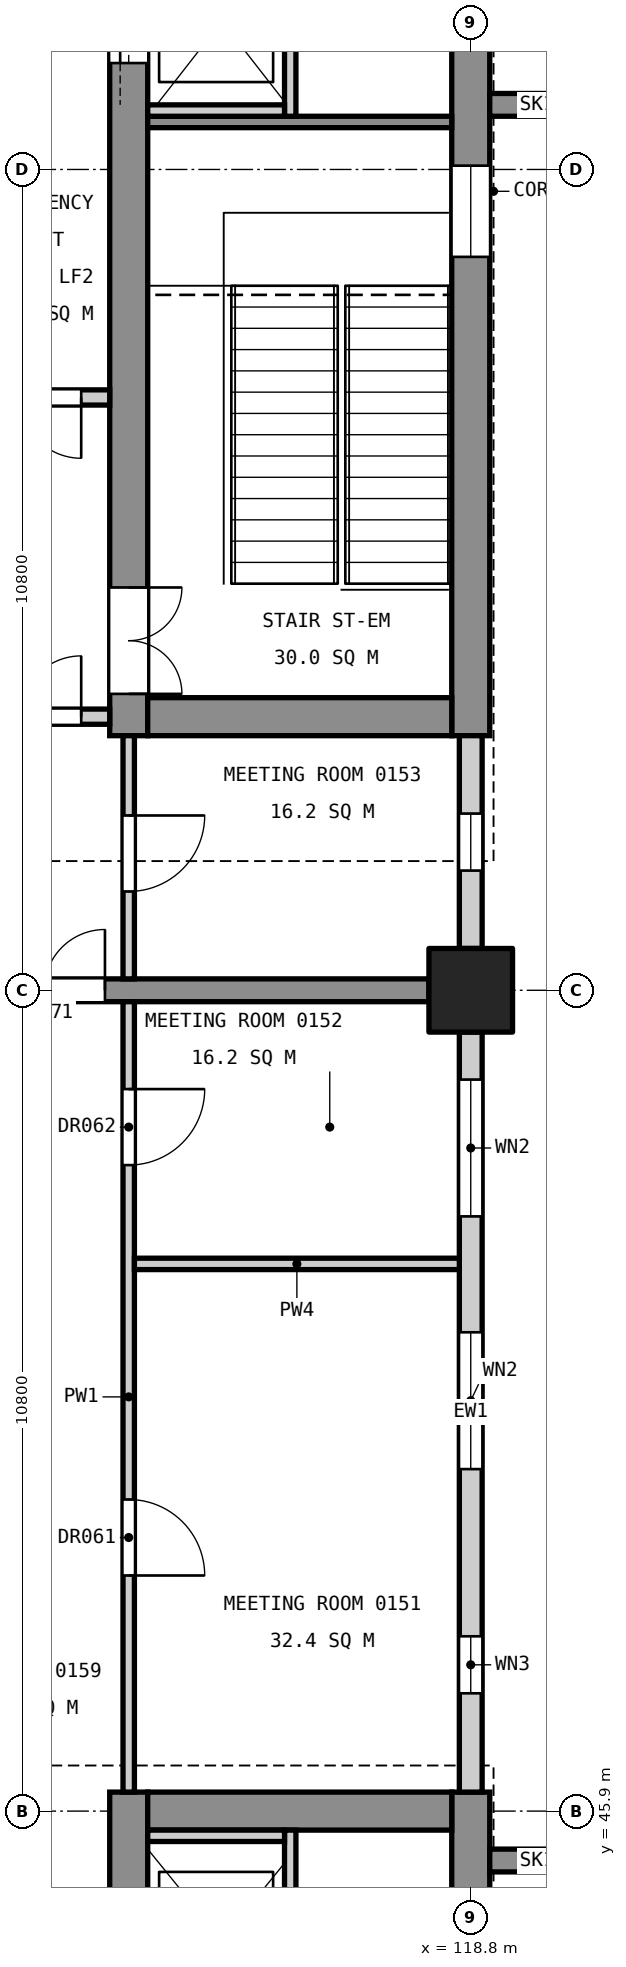
"""IFC4 building model, lengths in metres.
Left out: names, types, materials, properties, quantities, classifications, styles, units other than length and angle.
Written with IfcOpenShell. Run it as: python <this file> out.ifc"""

import sys

from ifc_helpers import new_model, si_unit, direction, frame, frame_2d, origin, origin_2d, place, context, subcontext, project, spatial, rectangle, extrude, element, fill, save


model = new_model("IFC4")
c1 = context("Model", 3, precision=1e-05, world=origin(), true_north=direction((0.0, 1.0)))
c2 = subcontext(c1, "Body", "Model", "MODEL_VIEW")
j1 = project(units=[si_unit("LENGTHUNIT", "METRE"), si_unit("PLANEANGLEUNIT", "RADIAN")], contexts=[c1])
p1 = place(None, origin())
s1 = spatial("IfcSite", under=j1, at=p1, CompositionType="ELEMENT")
p2 = place(p1, origin())
s2 = spatial("IfcBuilding", under=s1, at=p2, CompositionType="ELEMENT")
p3 = place(p2, frame((0.0, 0.0, 6.0)))
s3 = spatial("IfcBuildingStorey", under=s2, at=p3, CompositionType="ELEMENT", Elevation=6.0)
p4 = place(p3, frame((118.8, 56.7, 0.0), z_axis=(0.0, 0.0, 1.0), x_axis=(1.0, 0.0, 0.0)))
e1 = element("IfcColumn", 1, at=p4, inside=s3, PredefinedType="COLUMN", context=c2, shape_type="SweptSolid", body=[
    extrude(rectangle(XDim=1.1, YDim=1.1, at=origin_2d()), origin(), (0.0, 0.0, 1.0), 5.4),
])
p5 = place(p3, frame((118.8, 34.85, 0.0), z_axis=(0.0, 0.0, 1.0), x_axis=(0.0, 1.0, 0.0)))
e2 = element("IfcWall", 2, at=p5, inside=s3, PredefinedType="SHEAR", context=c2, shape_type="SweptSolid", body=[
    extrude(rectangle(XDim=11.3, YDim=0.5, at=frame_2d((5.65, 0.0))), origin(), (0.0, 0.0, 1.0), 5.1),
])
p6 = place(p5, frame((6.3, 0.0, 3.4)))
e3 = element("IfcOpeningElement", 3, at=p6, cuts=e2, PredefinedType="OPENING", context=c2, shape_type="SweptSolid", body=[
    extrude(rectangle(XDim=1.2, YDim=0.9, at=frame_2d((0.6, 0.45))), frame((0.0, 0.26, 0.0), z_axis=(0.0, -1.0, 0.0), x_axis=(1.0, 0.0, 0.0)), (0.0, 0.0, 1.0), 0.52),
])
p7 = place(p3, frame((114.3, 34.85, 0.0), z_axis=(0.0, 0.0, 1.0), x_axis=(0.0, 1.0, 0.0)))
e4 = element("IfcWall", 4, at=p7, inside=s3, PredefinedType="SHEAR", context=c2, shape_type="SweptSolid", body=[
    extrude(rectangle(XDim=11.3, YDim=0.5, at=frame_2d((5.65, 0.0))), origin(), (0.0, 0.0, 1.0), 5.1),
])
p8 = place(p7, frame((0.55, 0.0, 0.0)))
e5 = element("IfcOpeningElement", 5, at=p8, cuts=e4, PredefinedType="OPENING", context=c2, shape_type="SweptSolid", body=[
    extrude(rectangle(XDim=1.4, YDim=2.1, at=frame_2d((0.7, 1.05))), frame((0.0, 0.26, 0.0), z_axis=(0.0, -1.0, 0.0), x_axis=(1.0, 0.0, 0.0)), (0.0, 0.0, 1.0), 0.52),
])
p9 = place(p7, frame((8.8, 0.0, 0.0)))
e6 = element("IfcOpeningElement", 6, at=p9, cuts=e4, PredefinedType="OPENING", context=c2, shape_type="SweptSolid", body=[
    extrude(rectangle(XDim=1.1, YDim=2.1, at=frame_2d((0.55, 1.05))), frame((0.0, 0.26, 0.0), z_axis=(0.0, -1.0, 0.0), x_axis=(1.0, 0.0, 0.0)), (0.0, 0.0, 1.0), 0.52),
])
p10 = place(p3, frame((118.55, 45.9, 0.0), z_axis=(0.0, 0.0, 1.0), x_axis=(-1.0, 0.0, 0.0)))
e7 = element("IfcWall", 7, at=p10, inside=s3, PredefinedType="SHEAR", context=c2, shape_type="SweptSolid", body=[
    extrude(rectangle(XDim=4.0, YDim=0.5, at=frame_2d((2.0, 0.0))), origin(), (0.0, 0.0, 1.0), 5.1),
])
p11 = place(p3, frame((118.8, 60.05, 0.0), z_axis=(0.0, 0.0, 1.0), x_axis=(0.0, 1.0, 0.0)))
e8 = element("IfcWall", 8, at=p11, inside=s3, PredefinedType="SHEAR", context=c2, shape_type="SweptSolid", body=[
    extrude(rectangle(XDim=14.9, YDim=0.5, at=frame_2d((7.45, 0.0))), origin(), (0.0, 0.0, 1.0), 5.1),
])
p12 = place(p11, frame((6.3, 0.0, 3.4)))
e9 = element("IfcOpeningElement", 9, at=p12, cuts=e8, PredefinedType="OPENING", context=c2, shape_type="SweptSolid", body=[
    extrude(rectangle(XDim=1.2, YDim=0.9, at=frame_2d((0.6, 0.45))), frame((0.0, 0.26, 0.0), z_axis=(0.0, -1.0, 0.0), x_axis=(1.0, 0.0, 0.0)), (0.0, 0.0, 1.0), 0.52),
])
p13 = place(p3, frame((114.3, 60.05, 0.0), z_axis=(0.0, 0.0, 1.0), x_axis=(0.0, 1.0, 0.0)))
e10 = element("IfcWall", 10, at=p13, inside=s3, PredefinedType="SHEAR", context=c2, shape_type="SweptSolid", body=[
    extrude(rectangle(XDim=14.9, YDim=0.5, at=frame_2d((7.45, 0.0))), origin(), (0.0, 0.0, 1.0), 5.1),
])
p14 = place(p13, frame((0.55, 0.0, 0.0)))
e11 = element("IfcOpeningElement", 11, at=p14, cuts=e10, PredefinedType="OPENING", context=c2, shape_type="SweptSolid", body=[
    extrude(rectangle(XDim=1.4, YDim=2.1, at=frame_2d((0.7, 1.05))), frame((0.0, 0.26, 0.0), z_axis=(0.0, -1.0, 0.0), x_axis=(1.0, 0.0, 0.0)), (0.0, 0.0, 1.0), 0.52),
])
p15 = place(p13, frame((8.85, 0.0, 0.0)))
e12 = element("IfcOpeningElement", 12, at=p15, cuts=e10, PredefinedType="OPENING", context=c2, shape_type="SweptSolid", body=[
    extrude(rectangle(XDim=1.1, YDim=2.1, at=frame_2d((0.55, 1.05))), frame((0.0, 0.26, 0.0), z_axis=(0.0, -1.0, 0.0), x_axis=(1.0, 0.0, 0.0)), (0.0, 0.0, 1.0), 0.52),
])
p16 = place(p13, frame((11.4, 0.0, 0.0)))
e13 = element("IfcOpeningElement", 13, at=p16, cuts=e10, PredefinedType="OPENING", context=c2, shape_type="SweptSolid", body=[
    extrude(rectangle(XDim=1.1, YDim=2.1, at=frame_2d((0.55, 1.05))), frame((0.0, 0.26, 0.0), z_axis=(0.0, -1.0, 0.0), x_axis=(1.0, 0.0, 0.0)), (0.0, 0.0, 1.0), 0.52),
])
p17 = place(p3, frame((118.55, 60.3, 0.0), z_axis=(0.0, 0.0, 1.0), x_axis=(-1.0, 0.0, 0.0)))
e14 = element("IfcWall", 14, at=p17, inside=s3, PredefinedType="SHEAR", context=c2, shape_type="SweptSolid", body=[
    extrude(rectangle(XDim=4.0, YDim=0.5, at=frame_2d((2.0, 0.0))), origin(), (0.0, 0.0, 1.0), 5.1),
])
for number, where, z_axis, x_axis in (
    (15, (119.05, 45.25, 0.0), (0.0, 0.0, 1.0), (1.0, 0.0, 0.0)),
    (16, (119.05, 68.35, 0.0), (0.0, 0.0, 1.0), (1.0, 0.0, 0.0)),
):
    element("IfcWall", number, at=place(p3, frame(where, z_axis=z_axis, x_axis=x_axis)), inside=s3, PredefinedType="SHEAR", context=c2, shape_type="SweptSolid", body=[
        extrude(rectangle(XDim=1.25, YDim=0.3, at=frame_2d((0.625, 0.0))), origin(), (0.0, 0.0, 1.0), 5.4),
    ])
p18 = place(p3, frame((118.25, 56.7, 0.0), z_axis=(0.0, 0.0, 1.0), x_axis=(-1.0, 0.0, 0.0)))
e17 = element("IfcWall", 17, at=p18, inside=s3, PredefinedType="SHEAR", context=c2, shape_type="SweptSolid", body=[
    extrude(rectangle(XDim=6.1, YDim=0.3, at=frame_2d((3.05, 0.0))), origin(), (0.0, 0.0, 1.0), 5.1),
])
p19 = place(p18, frame((4.262, 0.0, 0.0)))
e18 = element("IfcOpeningElement", 18, at=p19, cuts=e17, PredefinedType="OPENING", context=c2, shape_type="SweptSolid", body=[
    extrude(rectangle(XDim=1.6, YDim=2.1, at=frame_2d((0.8, 1.05))), frame((0.0, 0.16, 0.0), z_axis=(0.0, -1.0, 0.0), x_axis=(1.0, 0.0, 0.0)), (0.0, 0.0, 1.0), 0.32),
])
p20 = place(p3, frame((118.55, 68.125, 0.0), z_axis=(0.0, 0.0, 1.0), x_axis=(-1.0, 0.0, 0.0)))
e19 = element("IfcWall", 19, at=p20, inside=s3, PredefinedType="SOLIDWALL", context=c2, shape_type="SweptSolid", body=[
    extrude(rectangle(XDim=4.0, YDim=0.15, at=frame_2d((2.0, 0.0))), origin(), (0.0, 0.0, 1.0), 5.1),
])
p21 = place(p3, frame((116.425, 43.0, 0.0), z_axis=(0.0, 0.0, 1.0), x_axis=(0.0, 1.0, 0.0)))
e20 = element("IfcWall", 20, at=p21, inside=s3, PredefinedType="SOLIDWALL", context=c2, shape_type="SweptSolid", body=[
    extrude(rectangle(XDim=2.65, YDim=0.15, at=frame_2d((1.325, 0.0))), origin(), (0.0, 0.0, 1.0), 5.4),
])
p22 = place(p3, frame((116.35, 45.575, 0.0), z_axis=(0.0, 0.0, 1.0), x_axis=(-1.0, 0.0, 0.0)))
e21 = element("IfcWall", 21, at=p22, inside=s3, PredefinedType="SOLIDWALL", context=c2, shape_type="SweptSolid", body=[
    extrude(rectangle(XDim=1.8, YDim=0.15, at=frame_2d((0.9, 0.0))), origin(), (0.0, 0.0, 1.0), 5.4),
])
p23 = place(p3, frame((116.425, 68.2, 0.0), z_axis=(0.0, 0.0, 1.0), x_axis=(0.0, 1.0, 0.0)))
e22 = element("IfcWall", 22, at=p23, inside=s3, PredefinedType="SOLIDWALL", context=c2, shape_type="SweptSolid", body=[
    extrude(rectangle(XDim=2.5, YDim=0.15, at=frame_2d((1.25, 0.0))), origin(), (0.0, 0.0, 1.0), 5.4),
])
p24 = place(p3, frame((116.35, 68.275, 0.0), z_axis=(0.0, 0.0, 1.0), x_axis=(-1.0, 0.0, 0.0)))
e23 = element("IfcWall", 23, at=p24, inside=s3, PredefinedType="SOLIDWALL", context=c2, shape_type="SweptSolid", body=[
    extrude(rectangle(XDim=1.8, YDim=0.15, at=frame_2d((0.9, 0.0))), origin(), (0.0, 0.0, 1.0), 5.4),
])
p25 = place(p3, frame((118.8, 46.15, 0.0), z_axis=(0.0, 0.0, 1.0), x_axis=(0.0, 1.0, 0.0)))
e24 = element("IfcWall", 24, at=p25, inside=s3, PredefinedType="STANDARD", context=c2, shape_type="SweptSolid", body=[
    extrude(rectangle(XDim=10.0, YDim=0.3, at=frame_2d((5.0, 0.0))), origin(), (0.0, 0.0, 1.0), 4.1),
])
p26 = place(p25, frame((1.3, 0.0, 0.8)))
e25 = element("IfcOpeningElement", 25, at=p26, cuts=e24, PredefinedType="OPENING", context=c2, shape_type="SweptSolid", body=[
    extrude(rectangle(XDim=0.75, YDim=1.2, at=frame_2d((0.375, 0.6))), frame((0.0, 0.16, 0.0), z_axis=(0.0, -1.0, 0.0), x_axis=(1.0, 0.0, 0.0)), (0.0, 0.0, 1.0), 0.32),
])
p27 = place(p25, frame((4.25, 0.0, 0.9)))
e26 = element("IfcOpeningElement", 26, at=p27, cuts=e24, PredefinedType="OPENING", context=c2, shape_type="SweptSolid", body=[
    extrude(rectangle(XDim=1.8, YDim=3.0, at=frame_2d((0.9, 1.5))), frame((0.0, 0.16, 0.0), z_axis=(0.0, -1.0, 0.0), x_axis=(1.0, 0.0, 0.0)), (0.0, 0.0, 1.0), 0.32),
])
p28 = place(p25, frame((7.575, 0.0, 0.9)))
e27 = element("IfcOpeningElement", 27, at=p28, cuts=e24, PredefinedType="OPENING", context=c2, shape_type="SweptSolid", body=[
    extrude(rectangle(XDim=1.8, YDim=3.0, at=frame_2d((0.9, 1.5))), frame((0.0, 0.16, 0.0), z_axis=(0.0, -1.0, 0.0), x_axis=(1.0, 0.0, 0.0)), (0.0, 0.0, 1.0), 0.32),
])
p29 = place(p3, frame((118.8, 57.25, 0.0), z_axis=(0.0, 0.0, 1.0), x_axis=(0.0, 1.0, 0.0)))
e28 = element("IfcWall", 28, at=p29, inside=s3, PredefinedType="STANDARD", context=c2, shape_type="SweptSolid", body=[
    extrude(rectangle(XDim=2.8, YDim=0.3, at=frame_2d((1.4, 0.0))), origin(), (0.0, 0.0, 1.0), 4.1),
])
p30 = place(p29, frame((1.025, 0.0, 0.8)))
e29 = element("IfcOpeningElement", 29, at=p30, cuts=e28, PredefinedType="OPENING", context=c2, shape_type="SweptSolid", body=[
    extrude(rectangle(XDim=0.75, YDim=1.2, at=frame_2d((0.375, 0.6))), frame((0.0, 0.16, 0.0), z_axis=(0.0, -1.0, 0.0), x_axis=(1.0, 0.0, 0.0)), (0.0, 0.0, 1.0), 0.32),
])
p31 = place(p3, frame((114.3, 46.15, 0.0), z_axis=(0.0, 0.0, 1.0), x_axis=(0.0, 1.0, 0.0)))
e30 = element("IfcWall", 30, at=p31, inside=s3, PredefinedType="PARTITIONING", context=c2, shape_type="SweptSolid", body=[
    extrude(rectangle(XDim=10.4, YDim=0.15, at=frame_2d((5.2, 0.0))), origin(), (0.0, 0.0, 1.0), 4.0),
])
p32 = place(p31, frame((2.85, 0.0, 0.0)))
e31 = element("IfcOpeningElement", 31, at=p32, cuts=e30, PredefinedType="OPENING", context=c2, shape_type="SweptSolid", body=[
    extrude(rectangle(XDim=1.0, YDim=2.1, at=frame_2d((0.5, 1.05))), frame((0.0, 0.085, 0.0), z_axis=(0.0, -1.0, 0.0), x_axis=(1.0, 0.0, 0.0)), (0.0, 0.0, 1.0), 0.17),
])
p33 = place(p31, frame((8.25, 0.0, 0.0)))
e32 = element("IfcOpeningElement", 32, at=p33, cuts=e30, PredefinedType="OPENING", context=c2, shape_type="SweptSolid", body=[
    extrude(rectangle(XDim=1.0, YDim=2.1, at=frame_2d((0.5, 1.05))), frame((0.0, 0.085, 0.0), z_axis=(0.0, -1.0, 0.0), x_axis=(1.0, 0.0, 0.0)), (0.0, 0.0, 1.0), 0.17),
])
p34 = place(p3, frame((114.3, 56.85, 0.0), z_axis=(0.0, 0.0, 1.0), x_axis=(0.0, 1.0, 0.0)))
e33 = element("IfcWall", 33, at=p34, inside=s3, PredefinedType="PARTITIONING", context=c2, shape_type="SweptSolid", body=[
    extrude(rectangle(XDim=3.2, YDim=0.15, at=frame_2d((1.6, 0.0))), origin(), (0.0, 0.0, 1.0), 4.0),
])
p35 = place(p34, frame((1.15, 0.0, 0.0)))
e34 = element("IfcOpeningElement", 34, at=p35, cuts=e33, PredefinedType="OPENING", context=c2, shape_type="SweptSolid", body=[
    extrude(rectangle(XDim=1.0, YDim=2.1, at=frame_2d((0.5, 1.05))), frame((0.0, 0.085, 0.0), z_axis=(0.0, -1.0, 0.0), x_axis=(1.0, 0.0, 0.0)), (0.0, 0.0, 1.0), 0.17),
])
p36 = place(p3, frame((118.65, 53.1, 0.0), z_axis=(0.0, 0.0, 1.0), x_axis=(-1.0, 0.0, 0.0)))
e35 = element("IfcWall", 35, at=p36, inside=s3, PredefinedType="PARTITIONING", context=c2, shape_type="SweptSolid", body=[
    extrude(rectangle(XDim=4.275, YDim=0.15, at=frame_2d((2.137, 0.0))), origin(), (0.0, 0.0, 1.0), 4.3),
])
p37 = place(p3, frame((114.05, 60.3, 0.0), z_axis=(0.0, 0.0, 1.0), x_axis=(-1.0, 0.0, 0.0)))
e36 = element("IfcWall", 36, at=p37, inside=s3, PredefinedType="PARTITIONING", context=c2, shape_type="SweptSolid", body=[
    extrude(rectangle(XDim=2.35, YDim=0.2, at=frame_2d((1.175, 0.0))), origin(), (0.0, 0.0, 1.0), 4.3),
])
p38 = place(p37, frame((0.375, 0.0, 0.0)))
e37 = element("IfcOpeningElement", 37, at=p38, cuts=e36, PredefinedType="OPENING", context=c2, shape_type="SweptSolid", body=[
    extrude(rectangle(XDim=1.6, YDim=2.1, at=frame_2d((0.8, 1.05))), frame((0.0, 0.11, 0.0), z_axis=(0.0, -1.0, 0.0), x_axis=(1.0, 0.0, 0.0)), (0.0, 0.0, 1.0), 0.22),
])
p39 = place(p3, frame((114.05, 64.5, 0.0), z_axis=(0.0, 0.0, 1.0), x_axis=(-1.0, 0.0, 0.0)))
e38 = element("IfcWall", 38, at=p39, inside=s3, PredefinedType="PARTITIONING", context=c2, shape_type="SweptSolid", body=[
    extrude(rectangle(XDim=2.35, YDim=0.2, at=frame_2d((1.175, 0.0))), origin(), (0.0, 0.0, 1.0), 4.0),
])
p40 = place(p39, frame((0.375, 0.0, 0.0)))
e39 = element("IfcOpeningElement", 39, at=p40, cuts=e38, PredefinedType="OPENING", context=c2, shape_type="SweptSolid", body=[
    extrude(rectangle(XDim=1.6, YDim=2.1, at=frame_2d((0.8, 1.05))), frame((0.0, 0.11, 0.0), z_axis=(0.0, -1.0, 0.0), x_axis=(1.0, 0.0, 0.0)), (0.0, 0.0, 1.0), 0.22),
])
p41 = place(p14, frame((1.4, 0.0, 0.0), z_axis=(0.0, 0.0, 1.0), x_axis=(-1.0, 0.0, 0.0)))
e40 = element("IfcDoor", 40, at=p41, inside=s3, OperationType="DOUBLE_DOOR_SINGLE_SWING", PredefinedType="DOOR", context=c2, shape_type="SweptSolid", body=[
    extrude(rectangle(XDim=1.4, YDim=2.1, at=frame_2d((0.7, 1.05))), frame((0.0, 0.025, 0.0), z_axis=(0.0, -1.0, 0.0), x_axis=(1.0, 0.0, 0.0)), (0.0, 0.0, 1.0), 0.05),
])
fill(e11, e40)
p42 = place(p15, origin())
e41 = element("IfcDoor", 41, at=p42, inside=s3, OperationType="SLIDING_TO_LEFT", PredefinedType="DOOR", context=c2, shape_type="SweptSolid", body=[
    extrude(rectangle(XDim=1.1, YDim=2.1, at=frame_2d((0.55, 1.05))), frame((0.0, 0.025, 0.0), z_axis=(0.0, -1.0, 0.0), x_axis=(1.0, 0.0, 0.0)), (0.0, 0.0, 1.0), 0.05),
])
fill(e12, e41)
p43 = place(p26, origin())
e42 = element("IfcWindow", 42, at=p43, inside=s3, PartitioningType="SINGLE_PANEL", PredefinedType="WINDOW", context=c2, shape_type="SweptSolid", body=[
    extrude(rectangle(XDim=0.75, YDim=1.2, at=frame_2d((0.375, 0.6))), frame((0.0, 0.03, 0.0), z_axis=(0.0, -1.0, 0.0), x_axis=(1.0, 0.0, 0.0)), (0.0, 0.0, 1.0), 0.06),
])
fill(e25, e42)
p44 = place(p27, origin())
e43 = element("IfcWindow", 43, at=p44, inside=s3, PartitioningType="SINGLE_PANEL", PredefinedType="WINDOW", context=c2, shape_type="SweptSolid", body=[
    extrude(rectangle(XDim=1.8, YDim=3.0, at=frame_2d((0.9, 1.5))), frame((0.0, 0.03, 0.0), z_axis=(0.0, -1.0, 0.0), x_axis=(1.0, 0.0, 0.0)), (0.0, 0.0, 1.0), 0.06),
])
fill(e26, e43)
p45 = place(p28, origin())
e44 = element("IfcWindow", 44, at=p45, inside=s3, PartitioningType="SINGLE_PANEL", PredefinedType="WINDOW", context=c2, shape_type="SweptSolid", body=[
    extrude(rectangle(XDim=1.8, YDim=3.0, at=frame_2d((0.9, 1.5))), frame((0.0, 0.03, 0.0), z_axis=(0.0, -1.0, 0.0), x_axis=(1.0, 0.0, 0.0)), (0.0, 0.0, 1.0), 0.06),
])
fill(e27, e44)
p46 = place(p30, origin())
e45 = element("IfcWindow", 45, at=p46, inside=s3, PartitioningType="SINGLE_PANEL", PredefinedType="WINDOW", context=c2, shape_type="SweptSolid", body=[
    extrude(rectangle(XDim=0.75, YDim=1.2, at=frame_2d((0.375, 0.6))), frame((0.0, 0.03, 0.0), z_axis=(0.0, -1.0, 0.0), x_axis=(1.0, 0.0, 0.0)), (0.0, 0.0, 1.0), 0.06),
])
fill(e29, e45)
p47 = place(p12, origin())
e46 = element("IfcWindow", 46, at=p47, inside=s3, PartitioningType="SINGLE_PANEL", PredefinedType="WINDOW", context=c2, shape_type="SweptSolid", body=[
    extrude(rectangle(XDim=1.2, YDim=0.9, at=frame_2d((0.6, 0.45))), frame((0.0, 0.03, 0.0), z_axis=(0.0, -1.0, 0.0), x_axis=(1.0, 0.0, 0.0)), (0.0, 0.0, 1.0), 0.06),
])
fill(e9, e46)
p48 = place(p32, frame((1.0, 0.0, 0.0), z_axis=(0.0, 0.0, 1.0), x_axis=(-1.0, 0.0, 0.0)))
e47 = element("IfcDoor", 47, at=p48, inside=s3, OperationType="SINGLE_SWING_RIGHT", PredefinedType="DOOR", context=c2, shape_type="SweptSolid", body=[
    extrude(rectangle(XDim=1.0, YDim=2.1, at=frame_2d((0.5, 1.05))), frame((0.0, 0.025, 0.0), z_axis=(0.0, -1.0, 0.0), x_axis=(1.0, 0.0, 0.0)), (0.0, 0.0, 1.0), 0.05),
])
fill(e31, e47)
p49 = place(p33, frame((1.0, 0.0, 0.0), z_axis=(0.0, 0.0, 1.0), x_axis=(-1.0, 0.0, 0.0)))
e48 = element("IfcDoor", 48, at=p49, inside=s3, OperationType="SINGLE_SWING_LEFT", PredefinedType="DOOR", context=c2, shape_type="SweptSolid", body=[
    extrude(rectangle(XDim=1.0, YDim=2.1, at=frame_2d((0.5, 1.05))), frame((0.0, 0.025, 0.0), z_axis=(0.0, -1.0, 0.0), x_axis=(1.0, 0.0, 0.0)), (0.0, 0.0, 1.0), 0.05),
])
fill(e32, e48)
p50 = place(p35, frame((1.0, 0.0, 0.0), z_axis=(0.0, 0.0, 1.0), x_axis=(-1.0, 0.0, 0.0)))
e49 = element("IfcDoor", 49, at=p50, inside=s3, OperationType="SINGLE_SWING_LEFT", PredefinedType="DOOR", context=c2, shape_type="SweptSolid", body=[
    extrude(rectangle(XDim=1.0, YDim=2.1, at=frame_2d((0.5, 1.05))), frame((0.0, 0.025, 0.0), z_axis=(0.0, -1.0, 0.0), x_axis=(1.0, 0.0, 0.0)), (0.0, 0.0, 1.0), 0.05),
])
fill(e34, e49)
p51 = place(p38, frame((1.6, 0.0, 0.0), z_axis=(0.0, 0.0, 1.0), x_axis=(-1.0, 0.0, 0.0)))
e50 = element("IfcDoor", 50, at=p51, inside=s3, OperationType="DOUBLE_DOOR_SINGLE_SWING", PredefinedType="DOOR", context=c2, shape_type="SweptSolid", body=[
    extrude(rectangle(XDim=1.6, YDim=2.1, at=frame_2d((0.8, 1.05))), frame((0.0, 0.025, 0.0), z_axis=(0.0, -1.0, 0.0), x_axis=(1.0, 0.0, 0.0)), (0.0, 0.0, 1.0), 0.05),
])
fill(e37, e50)
p52 = place(p40, origin())
e51 = element("IfcDoor", 51, at=p52, inside=s3, OperationType="DOUBLE_DOOR_SINGLE_SWING", PredefinedType="DOOR", context=c2, shape_type="SweptSolid", body=[
    extrude(rectangle(XDim=1.6, YDim=2.1, at=frame_2d((0.8, 1.05))), frame((0.0, 0.025, 0.0), z_axis=(0.0, -1.0, 0.0), x_axis=(1.0, 0.0, 0.0)), (0.0, 0.0, 1.0), 0.05),
])
fill(e39, e51)
p53 = place(p19, frame((1.6, 0.0, 0.0), z_axis=(0.0, 0.0, 1.0), x_axis=(-1.0, 0.0, 0.0)))
e52 = element("IfcDoor", 52, at=p53, inside=s3, OperationType="DOUBLE_DOOR_SINGLE_SWING", PredefinedType="DOOR", context=c2, shape_type="SweptSolid", body=[
    extrude(rectangle(XDim=1.6, YDim=2.1, at=frame_2d((0.8, 1.05))), frame((0.0, 0.025, 0.0), z_axis=(0.0, -1.0, 0.0), x_axis=(1.0, 0.0, 0.0)), (0.0, 0.0, 1.0), 0.05),
])
fill(e18, e52)
save(model, sys.argv[1])
